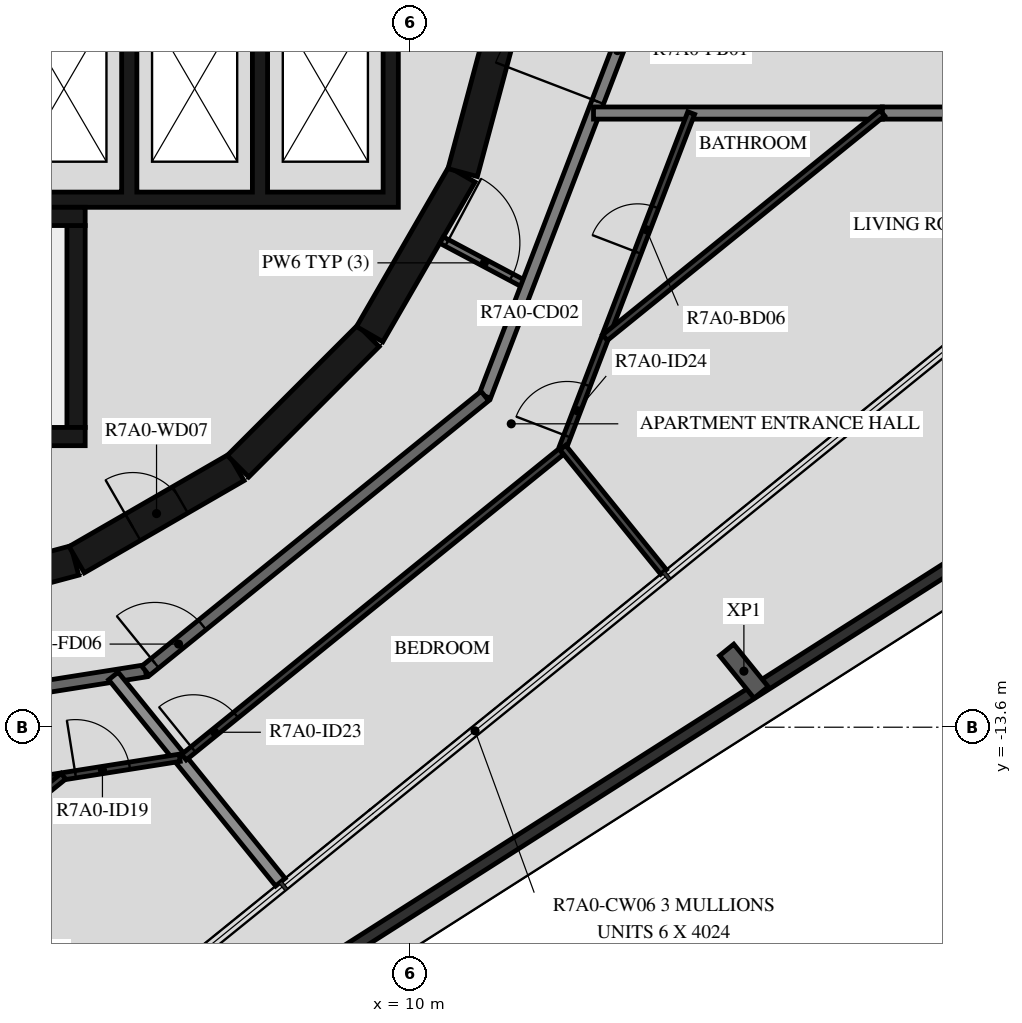
"""IFC4 building model, lengths in metres.
Left out: names, types, materials, properties, quantities, classifications, styles, units other than length and angle.
Written with IfcOpenShell. Run it as: python <this file> out.ifc"""

import sys

from ifc_helpers import new_model, si_unit, direction, frame, frame_2d, origin, origin_2d, place, context, subcontext, project, spatial, polyline, rectangle, i_section, outline, extrude, element, fill, save


model = new_model("IFC4")
c1 = context("Model", 3, precision=1e-05, world=origin(), true_north=direction((0.0, 1.0)))
c2 = subcontext(c1, "Body", "Model", "MODEL_VIEW")
j1 = project(units=[si_unit("LENGTHUNIT", "METRE"), si_unit("PLANEANGLEUNIT", "RADIAN")], contexts=[c1])
p1 = place(None, origin())
s1 = spatial("IfcSite", under=j1, at=p1, CompositionType="ELEMENT")
p2 = place(p1, origin())
s2 = spatial("IfcBuilding", under=s1, at=p2, CompositionType="ELEMENT")
p3 = place(p2, frame((0.0, 0.0, 263.4)))
s3 = spatial("IfcBuildingStorey", under=s2, at=p3, CompositionType="ELEMENT", Elevation=263.4)
p4 = place(p3, frame((15.483, -12.678, -0.45), z_axis=(0.0, 0.0, 1.0), x_axis=(-0.777146167973, -0.629320136024, 0.0)))
e1 = element("IfcColumn", 1, at=p4, inside=s3, PredefinedType="COLUMN", context=c2, shape_type="SweptSolid", body=[
    extrude(i_section(OverallWidth=0.3, OverallDepth=0.9, WebThickness=0.019, FlangeThickness=0.035, FilletRadius=0.03, at=origin_2d()), origin(), (0.0, 0.0, 1.0), 3.57),
])
p5 = place(p3, frame((24.757, -7.212, 0.03), z_axis=(0.0, 0.0, 1.0), x_axis=(-0.843392095095, -0.537298589177, 0.0)))
e2 = element("IfcWall", 2, at=p5, inside=s3, PredefinedType="PARAPET", context=c2, shape_type="SweptSolid", body=[
    extrude(rectangle(XDim=34.009, YDim=0.2, at=frame_2d((17.004, 0.0))), origin(), (0.0, 0.0, 1.0), 1.5),
])
p6 = place(p3, frame((1.55, -11.643, 0.0), z_axis=(0.0, 0.0, 1.0), x_axis=(0.965948410781, 0.258734743916, 0.0)))
e3 = element("IfcWall", 3, at=p6, inside=s3, PredefinedType="SHEAR", context=c2, shape_type="SweptSolid", body=[
    extrude(rectangle(XDim=3.033, YDim=0.5, at=frame_2d((1.516, 0.0))), origin(), (0.0, 0.0, 1.0), 3.12),
])
p7 = place(p3, frame((4.51, -10.845, 0.0), z_axis=(0.0, 0.0, 1.0), x_axis=(0.865975092491, 0.500087131594, 0.0)))
e4 = element("IfcWall", 4, at=p7, inside=s3, PredefinedType="SHEAR", context=c2, shape_type="SweptSolid", body=[
    extrude(rectangle(XDim=3.033, YDim=0.5, at=frame_2d((1.516, 0.0))), origin(), (0.0, 0.0, 1.0), 3.12),
])
p8 = place(p7, frame((1.066, 0.0, 0.0)))
e5 = element("IfcOpeningElement", 5, at=p8, cuts=e4, PredefinedType="OPENING", context=c2, shape_type="SweptSolid", body=[
    extrude(rectangle(XDim=0.9, YDim=2.1, at=frame_2d((0.45, 1.05))), frame((0.0, 0.26, 0.0), z_axis=(0.0, -1.0, 0.0), x_axis=(1.0, 0.0, 0.0)), (0.0, 0.0, 1.0), 0.52),
])
p9 = place(p3, frame((7.164, -9.308, 0.0), z_axis=(0.0, 0.0, 1.0), x_axis=(0.707106781187, 0.707106781187, 0.0)))
e6 = element("IfcWall", 6, at=p9, inside=s3, PredefinedType="SHEAR", context=c2, shape_type="SweptSolid", body=[
    extrude(rectangle(XDim=3.032, YDim=0.5, at=frame_2d((1.516, 0.0))), origin(), (0.0, 0.0, 1.0), 3.12),
])
for number, where, z_axis, x_axis in (
    (7, (9.329, -7.137, 0.0), (0.0, 0.0, 1.0), (0.5, 0.866, 0.0)),
    (8, (10.858, -4.479, 0.0), (0.0, 0.0, 1.0), (0.259, 0.966, 0.0)),
):
    element("IfcWall", number, at=place(p3, frame(where, z_axis=z_axis, x_axis=x_axis)), inside=s3, PredefinedType="SHEAR", context=c2, shape_type="SweptSolid", body=[
        extrude(rectangle(XDim=3.033, YDim=0.5, at=frame_2d((1.516, 0.0))), origin(), (0.0, 0.0, 1.0), 3.12),
    ])
p10 = place(p3, frame((-2.4, -5.2, 0.0), z_axis=(0.0, 0.0, 1.0), x_axis=(1.0, 0.0, 0.0)))
e9 = element("IfcWall", 9, at=p10, inside=s3, PredefinedType="SHEAR", context=c2, shape_type="SweptSolid", body=[
    extrude(rectangle(XDim=7.05, YDim=0.3, at=frame_2d((3.525, 0.0))), origin(), (0.0, 0.0, 1.0), 3.12),
])
p11 = place(p3, frame((4.5, -8.67, 0.0), z_axis=(0.0, 0.0, 1.0), x_axis=(0.0, 1.0, 0.0)))
e10 = element("IfcWall", 10, at=p11, inside=s3, PredefinedType="SHEAR", context=c2, shape_type="SweptSolid", body=[
    extrude(rectangle(XDim=3.32, YDim=0.3, at=frame_2d((1.66, 0.0))), origin(), (0.0, 0.0, 1.0), 3.12),
])
p12 = place(p3, frame((0.1, -8.82, 0.0), z_axis=(0.0, 0.0, 1.0), x_axis=(1.0, 0.0, 0.0)))
e11 = element("IfcWall", 11, at=p12, inside=s3, PredefinedType="SHEAR", context=c2, shape_type="SweptSolid", body=[
    extrude(rectangle(XDim=4.55, YDim=0.3, at=frame_2d((2.275, 0.0))), origin(), (0.0, 0.0, 1.0), 3.12),
])
p13 = place(p3, origin())
e12 = element("IfcWall", 12, at=p13, inside=s3, PredefinedType="SHEAR", context=c2, shape_type="SweptSolid", body=[
    extrude(outline(polyline([(9.8, -5.05), (9.8, -4.8), (9.8, -1.9), (9.55, -1.9), (9.55, -4.8), (7.65, -4.8), (7.65, -1.9), (7.4, -1.9), (7.4, -4.8), (5.5, -4.8), (5.5, -1.9), (5.25, -1.9), (5.25, -4.8), (3.35, -4.8), (3.35, -1.9), (3.1, -1.9), (3.1, -4.8), (1.2, -4.8), (1.2, -1.9), (0.95, -1.9), (0.95, -4.8), (-0.95, -4.8), (-0.95, -1.9), (-1.2, -1.9), (-1.2, -4.8), (-3.1, -4.8), (-3.1, -1.9), (-3.35, -1.9), (-3.35, -4.8), (-5.25, -4.8), (-5.25, -1.9), (-5.5, -1.9), (-5.5, -4.8), (-7.4, -4.8), (-7.4, -1.9), (-7.65, -1.9), (-7.65, -4.8), (-9.55, -4.8), (-9.55, -1.9), (-9.8, -1.9), (-9.8, -4.8), (-9.8, -5.05), (9.8, -5.05)])), origin(), (0.0, 0.0, 1.0), 3.12),
])
p14 = place(p3, frame((10.511, -5.589, 0.0), z_axis=(0.0, 0.0, 1.0), x_axis=(0.882983002821, -0.469404960273, 0.0)))
e13 = element("IfcWall", 13, at=p14, inside=s3, PredefinedType="PARTITIONING", context=c2, shape_type="SweptSolid", body=[
    extrude(rectangle(XDim=1.596, YDim=0.12, at=frame_2d((0.798, 0.0))), origin(), (0.0, 0.0, 1.0), 3.12),
])
p15 = place(p14, frame((0.1, 0.0, 0.0)))
e14 = element("IfcOpeningElement", 14, at=p15, cuts=e13, PredefinedType="OPENING", context=c2, shape_type="SweptSolid", body=[
    extrude(rectangle(XDim=1.2, YDim=2.1, at=frame_2d((0.6, 1.05))), frame((0.0, 0.07, 0.0), z_axis=(0.0, -1.0, 0.0), x_axis=(1.0, 0.0, 0.0)), (0.0, 0.0, 1.0), 0.14),
])
p16 = place(p3, frame((11.223, -8.154, 0.0), z_axis=(0.0, 0.0, 1.0), x_axis=(0.358341090983, 0.93359073609, 0.0)))
e15 = element("IfcWall", 15, at=p16, inside=s3, PredefinedType="STANDARD", context=c2, shape_type="SweptSolid", body=[
    extrude(rectangle(XDim=7.181, YDim=0.2, at=frame_2d((3.59, 0.0))), origin(), (0.0, 0.0, 1.0), 3.12),
])
p17 = place(p16, frame((5.185, 0.0, 0.0)))
e16 = element("IfcOpeningElement", 16, at=p17, cuts=e15, PredefinedType="OPENING", context=c2, shape_type="SweptSolid", body=[
    extrude(rectangle(XDim=1.8, YDim=2.1, at=frame_2d((0.9, 1.05))), frame((0.0, 0.11, 0.0), z_axis=(0.0, -1.0, 0.0), x_axis=(1.0, 0.0, 0.0)), (0.0, 0.0, 1.0), 0.22),
])
p18 = place(p3, frame((-1.45, -13.797, 0.0), z_axis=(0.0, 0.0, 1.0), x_axis=(0.987690361611, 0.156421704315, 0.0)))
e17 = element("IfcWall", 17, at=p18, inside=s3, PredefinedType="STANDARD", context=c2, shape_type="SweptSolid", body=[
    extrude(rectangle(XDim=7.181, YDim=0.2, at=frame_2d((3.591, 0.0))), origin(), (0.0, 0.0, 1.0), 3.12),
])
p19 = place(p18, frame((0.2, 0.0, 0.0)))
e18 = element("IfcOpeningElement", 18, at=p19, cuts=e17, PredefinedType="OPENING", context=c2, shape_type="SweptSolid", body=[
    extrude(rectangle(XDim=1.0, YDim=2.1, at=frame_2d((0.5, 1.05))), frame((0.0, 0.11, 0.0), z_axis=(0.0, -1.0, 0.0), x_axis=(1.0, 0.0, 0.0)), (0.0, 0.0, 1.0), 0.22),
])
p20 = place(p3, frame((5.643, -12.673, 0.0), z_axis=(0.0, 0.0, 1.0), x_axis=(0.777160148113, 0.629302871585, 0.0)))
e19 = element("IfcWall", 19, at=p20, inside=s3, PredefinedType="STANDARD", context=c2, shape_type="SweptSolid", body=[
    extrude(rectangle(XDim=7.181, YDim=0.2, at=frame_2d((3.59, 0.0))), origin(), (0.0, 0.0, 1.0), 3.12),
])
p21 = place(p20, frame((0.2, 0.0, 0.0)))
e20 = element("IfcOpeningElement", 20, at=p21, cuts=e19, PredefinedType="OPENING", context=c2, shape_type="SweptSolid", body=[
    extrude(rectangle(XDim=1.0, YDim=2.1, at=frame_2d((0.5, 1.05))), frame((0.0, 0.11, 0.0), z_axis=(0.0, -1.0, 0.0), x_axis=(1.0, 0.0, 0.0)), (0.0, 0.0, 1.0), 0.22),
])
p22 = place(p3, frame((13.01, -3.5, 0.0), z_axis=(0.0, 0.0, 1.0), x_axis=(1.0, 0.0, 0.0)))
e21 = element("IfcWall", 21, at=p22, inside=s3, PredefinedType="STANDARD", context=c2, shape_type="SweptSolid", body=[
    extrude(rectangle(XDim=4.75, YDim=0.2, at=frame_2d((2.375, 0.0))), origin(), (0.0, 0.0, 1.0), 3.12),
])
p23 = place(p3, frame((17.76, -3.5, 0.0), z_axis=(0.0, 0.0, 1.0), x_axis=(1.0, 0.0, 0.0)))
e22 = element("IfcWall", 22, at=p23, inside=s3, PredefinedType="STANDARD", context=c2, shape_type="SweptSolid", body=[
    extrude(rectangle(XDim=1.64, YDim=0.2, at=frame_2d((0.82, 0.0))), origin(), (0.0, 0.0, 1.0), 3.12),
])
p24 = place(p3, frame((7.861, -16.148, 0.0), z_axis=(0.0, 0.0, 1.0), x_axis=(-0.629330189513, 0.777138026716, 0.0)))
e23 = element("IfcWall", 23, at=p24, inside=s3, PredefinedType="STANDARD", context=c2, shape_type="SweptSolid", body=[
    extrude(rectangle(XDim=4.364, YDim=0.2, at=frame_2d((2.182, 0.0))), origin(), (0.0, 0.0, 1.0), 2.73),
])
p25 = place(p3, frame((-1.318, -15.294, 0.0), z_axis=(0.0, 0.0, 1.0), x_axis=(0.987689040792, 0.156430044108, 0.0)))
e24 = element("IfcWall", 24, at=p25, inside=s3, PredefinedType="PARTITIONING", context=c2, shape_type="SweptSolid", body=[
    extrude(rectangle(XDim=7.616, YDim=0.12, at=frame_2d((3.808, 0.0))), origin(), (0.0, 0.0, 1.0), 3.12),
])
p26 = place(p25, frame((0.4, 0.0, 0.0)))
e25 = element("IfcOpeningElement", 25, at=p26, cuts=e24, PredefinedType="OPENING", context=c2, shape_type="SweptSolid", body=[
    extrude(rectangle(XDim=0.8, YDim=2.1, at=frame_2d((0.4, 1.05))), frame((0.0, 0.07, 0.0), z_axis=(0.0, -1.0, 0.0), x_axis=(1.0, 0.0, 0.0)), (0.0, 0.0, 1.0), 0.14),
])
p27 = place(p25, frame((5.88, 0.0, 0.0)))
e26 = element("IfcOpeningElement", 26, at=p27, cuts=e24, PredefinedType="OPENING", context=c2, shape_type="SweptSolid", body=[
    extrude(rectangle(XDim=0.9, YDim=2.1, at=frame_2d((0.45, 1.05))), frame((0.0, 0.07, 0.0), z_axis=(0.0, -1.0, 0.0), x_axis=(1.0, 0.0, 0.0)), (0.0, 0.0, 1.0), 0.14),
])
p28 = place(p3, frame((-3.875, -21.019, 0.0), z_axis=(0.0, 0.0, 1.0), x_axis=(0.777149096542, 0.629316519523, 0.0)))
e27 = element("IfcWall", 27, at=p28, inside=s3, PredefinedType="PARTITIONING", context=c2, shape_type="SweptSolid", body=[
    extrude(rectangle(XDim=10.508, YDim=0.12, at=frame_2d((5.254, 0.0))), origin(), (0.0, 0.0, 1.0), 3.12),
])
p29 = place(p28, frame((1.23, 0.0, 0.0)))
e28 = element("IfcOpeningElement", 28, at=p29, cuts=e27, PredefinedType="OPENING", context=c2, shape_type="SweptSolid", body=[
    extrude(rectangle(XDim=0.9, YDim=2.1, at=frame_2d((0.45, 1.05))), frame((0.0, 0.07, 0.0), z_axis=(0.0, -1.0, 0.0), x_axis=(1.0, 0.0, 0.0)), (0.0, 0.0, 1.0), 0.14),
])
p30 = place(p3, frame((6.274, -14.092, 0.0), z_axis=(0.0, 0.0, 1.0), x_axis=(0.777135206268, 0.62933367237, 0.0)))
e29 = element("IfcWall", 29, at=p30, inside=s3, PredefinedType="PARTITIONING", context=c2, shape_type="SweptSolid", body=[
    extrude(rectangle(XDim=7.985, YDim=0.12, at=frame_2d((3.992, 0.0))), origin(), (0.0, 0.0, 1.0), 3.12),
])
p31 = place(p30, frame((0.2, 0.0, 0.0)))
e30 = element("IfcOpeningElement", 30, at=p31, cuts=e29, PredefinedType="OPENING", context=c2, shape_type="SweptSolid", body=[
    extrude(rectangle(XDim=0.9, YDim=2.1, at=frame_2d((0.45, 1.05))), frame((0.0, 0.07, 0.0), z_axis=(0.0, -1.0, 0.0), x_axis=(1.0, 0.0, 0.0)), (0.0, 0.0, 1.0), 0.14),
])
p32 = place(p3, frame((12.505, -9.001, 0.0), z_axis=(0.0, 0.0, 1.0), x_axis=(0.358373707046, 0.933578216379, 0.0)))
e31 = element("IfcWall", 31, at=p32, inside=s3, PredefinedType="PARTITIONING", context=c2, shape_type="SweptSolid", body=[
    extrude(rectangle(XDim=5.892, YDim=0.12, at=frame_2d((2.946, 0.0))), origin(), (0.0, 0.0, 1.0), 3.12),
])
p33 = place(p32, frame((0.2, 0.0, 0.0)))
e32 = element("IfcOpeningElement", 32, at=p33, cuts=e31, PredefinedType="OPENING", context=c2, shape_type="SweptSolid", body=[
    extrude(rectangle(XDim=0.9, YDim=2.1, at=frame_2d((0.45, 1.05))), frame((0.0, 0.07, 0.0), z_axis=(0.0, -1.0, 0.0), x_axis=(1.0, 0.0, 0.0)), (0.0, 0.0, 1.0), 0.14),
])
p34 = place(p32, frame((3.436, 0.0, 0.0)))
e33 = element("IfcOpeningElement", 33, at=p34, cuts=e31, PredefinedType="OPENING", context=c2, shape_type="SweptSolid", body=[
    extrude(rectangle(XDim=0.8, YDim=2.1, at=frame_2d((0.4, 1.05))), frame((0.0, 0.07, 0.0), z_axis=(0.0, -1.0, 0.0), x_axis=(1.0, 0.0, 0.0)), (0.0, 0.0, 1.0), 0.14),
])
p35 = place(p3, frame((14.161, -11.046, 0.0), z_axis=(0.0, 0.0, 1.0), x_axis=(-0.62931028473, 0.777154145284, 0.0)))
e34 = element("IfcWall", 34, at=p35, inside=s3, PredefinedType="PARTITIONING", context=c2, shape_type="SweptSolid", body=[
    extrude(rectangle(XDim=2.632, YDim=0.12, at=frame_2d((1.316, 0.0))), origin(), (0.0, 0.0, 1.0), 2.73),
])
p36 = place(p3, frame((17.76, -3.5, 0.0), z_axis=(0.0, 0.0, 1.0), x_axis=(-0.777133455716, -0.62933583404, 0.0)))
e35 = element("IfcWall", 35, at=p36, inside=s3, PredefinedType="PARTITIONING", context=c2, shape_type="SweptSolid", body=[
    extrude(rectangle(XDim=5.869, YDim=0.12, at=frame_2d((2.935, 0.0))), origin(), (0.0, 0.0, 1.0), 3.12),
])
p37 = place(p8, origin())
e36 = element("IfcDoor", 36, at=p37, inside=s3, OperationType="SINGLE_SWING_LEFT", PredefinedType="DOOR", context=c2, shape_type="SweptSolid", body=[
    extrude(rectangle(XDim=0.9, YDim=2.1, at=frame_2d((0.45, 1.05))), frame((0.0, 0.025, 0.0), z_axis=(0.0, -1.0, 0.0), x_axis=(1.0, 0.0, 0.0)), (0.0, 0.0, 1.0), 0.05),
])
fill(e5, e36)
p38 = place(p27, origin())
e37 = element("IfcDoor", 37, at=p38, inside=s3, OperationType="SINGLE_SWING_LEFT", PredefinedType="DOOR", context=c2, shape_type="SweptSolid", body=[
    extrude(rectangle(XDim=0.9, YDim=2.1, at=frame_2d((0.45, 1.05))), frame((0.0, 0.025, 0.0), z_axis=(0.0, -1.0, 0.0), x_axis=(1.0, 0.0, 0.0)), (0.0, 0.0, 1.0), 0.05),
])
fill(e26, e37)
p39 = place(p21, origin())
e38 = element("IfcDoor", 38, at=p39, inside=s3, OperationType="SINGLE_SWING_LEFT", PredefinedType="DOOR", context=c2, shape_type="SweptSolid", body=[
    extrude(rectangle(XDim=1.0, YDim=2.1, at=frame_2d((0.5, 1.05))), frame((0.0, 0.025, 0.0), z_axis=(0.0, -1.0, 0.0), x_axis=(1.0, 0.0, 0.0)), (0.0, 0.0, 1.0), 0.05),
])
fill(e20, e38)
p40 = place(p31, origin())
e39 = element("IfcDoor", 39, at=p40, inside=s3, OperationType="SINGLE_SWING_LEFT", PredefinedType="DOOR", context=c2, shape_type="SweptSolid", body=[
    extrude(rectangle(XDim=0.9, YDim=2.1, at=frame_2d((0.45, 1.05))), frame((0.0, 0.025, 0.0), z_axis=(0.0, -1.0, 0.0), x_axis=(1.0, 0.0, 0.0)), (0.0, 0.0, 1.0), 0.05),
])
fill(e30, e39)
p41 = place(p33, origin())
e40 = element("IfcDoor", 40, at=p41, inside=s3, OperationType="SINGLE_SWING_RIGHT", PredefinedType="DOOR", context=c2, shape_type="SweptSolid", body=[
    extrude(rectangle(XDim=0.9, YDim=2.1, at=frame_2d((0.45, 1.05))), frame((0.0, 0.025, 0.0), z_axis=(0.0, -1.0, 0.0), x_axis=(1.0, 0.0, 0.0)), (0.0, 0.0, 1.0), 0.05),
])
fill(e32, e40)
p42 = place(p34, origin())
e41 = element("IfcDoor", 41, at=p42, inside=s3, OperationType="SINGLE_SWING_RIGHT", PredefinedType="DOOR", context=c2, shape_type="SweptSolid", body=[
    extrude(rectangle(XDim=0.8, YDim=2.1, at=frame_2d((0.4, 1.05))), frame((0.0, 0.025, 0.0), z_axis=(0.0, -1.0, 0.0), x_axis=(1.0, 0.0, 0.0)), (0.0, 0.0, 1.0), 0.05),
])
fill(e33, e41)
p43 = place(p15, origin())
e42 = element("IfcDoor", 42, at=p43, inside=s3, OperationType="DOUBLE_DOOR_SINGLE_SWING", PredefinedType="DOOR", context=c2, shape_type="SweptSolid", body=[
    extrude(rectangle(XDim=1.2, YDim=2.1, at=frame_2d((0.6, 1.05))), frame((0.0, 0.025, 0.0), z_axis=(0.0, -1.0, 0.0), x_axis=(1.0, 0.0, 0.0)), (0.0, 0.0, 1.0), 0.05),
])
fill(e14, e42)
p44 = place(p17, origin())
e43 = element("IfcDoor", 43, at=p44, inside=s3, OperationType="DOUBLE_DOOR_SINGLE_SWING", PredefinedType="DOOR", context=c2, shape_type="SweptSolid", body=[
    extrude(rectangle(XDim=1.8, YDim=2.1, at=frame_2d((0.9, 1.05))), frame((0.0, 0.025, 0.0), z_axis=(0.0, -1.0, 0.0), x_axis=(1.0, 0.0, 0.0)), (0.0, 0.0, 1.0), 0.05),
])
fill(e16, e43)
save(model, sys.argv[1])
